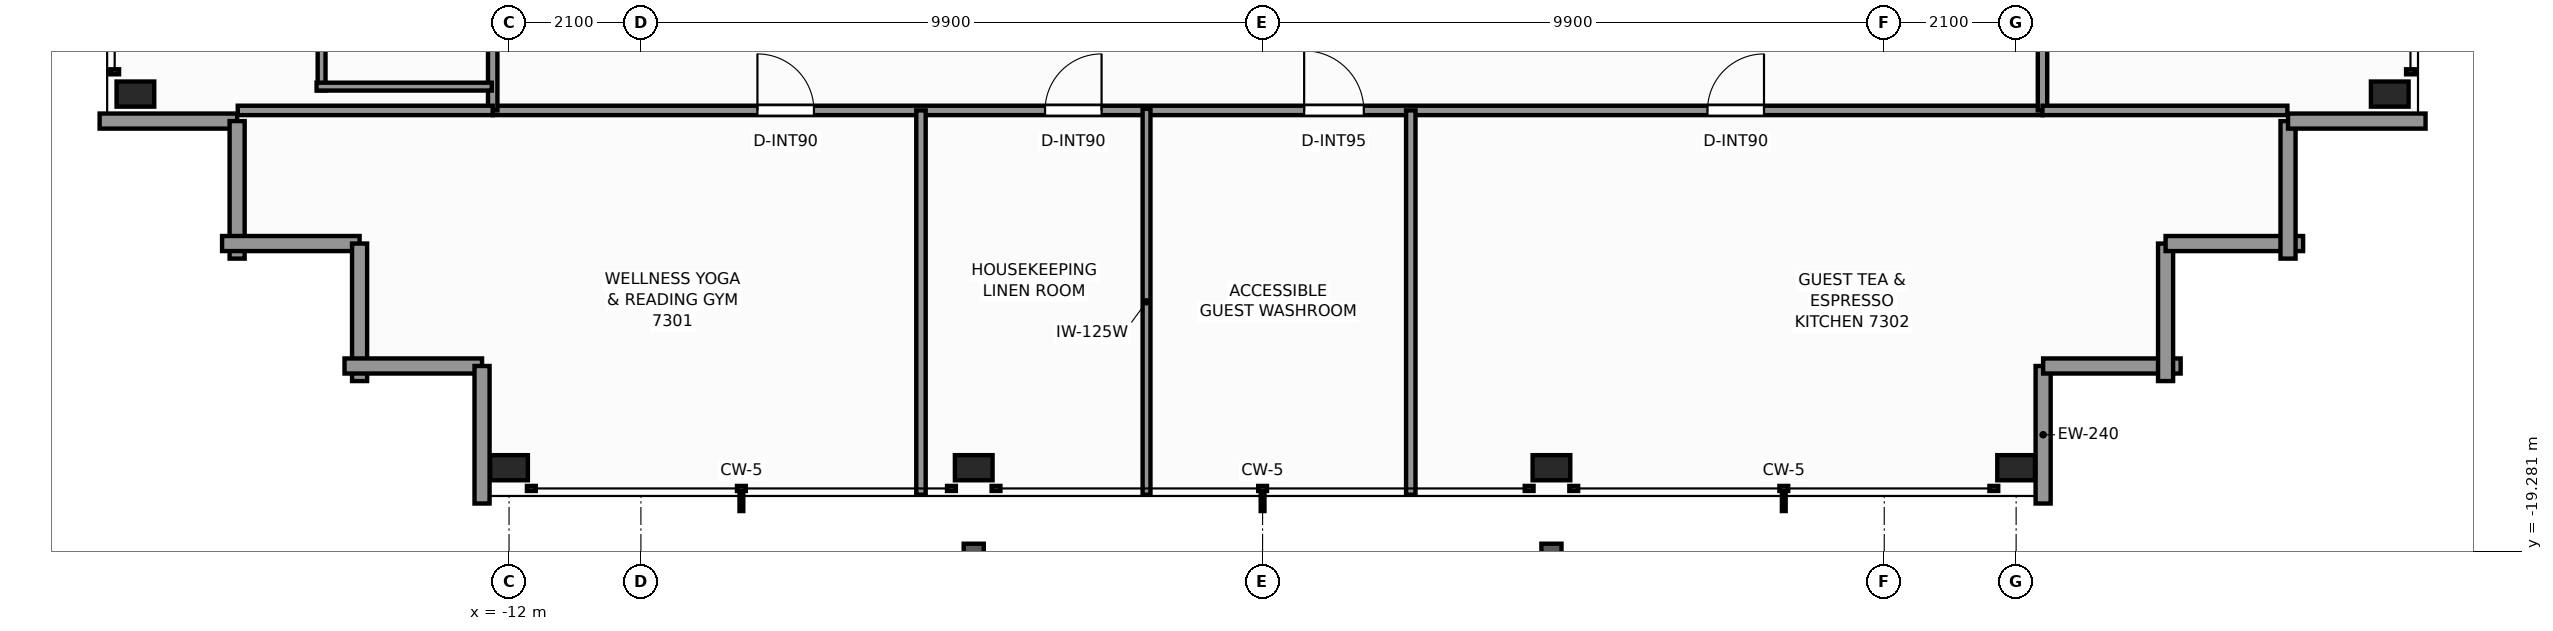
"""IFC4 building model, lengths in metres.
Left out: names, types, materials, properties, quantities, classifications, styles, units other than length and angle.
Written with IfcOpenShell. Run it as: python <this file> out.ifc"""

import sys

from ifc_helpers import new_model, si_unit, direction, frame, frame_2d, origin, origin_2d, place, context, subcontext, project, spatial, rectangle, extrude, element, fill, save


model = new_model("IFC4")
c1 = context("Model", 3, precision=1e-05, world=origin(), true_north=direction((0.0, 1.0)))
c2 = subcontext(c1, "Body", "Model", "MODEL_VIEW")
j1 = project(units=[si_unit("LENGTHUNIT", "METRE"), si_unit("PLANEANGLEUNIT", "RADIAN")], contexts=[c1])
p1 = place(None, origin())
s1 = spatial("IfcSite", under=j1, at=p1, CompositionType="ELEMENT")
p2 = place(p1, origin())
s2 = spatial("IfcBuilding", under=s1, at=p2, CompositionType="ELEMENT")
p3 = place(p2, frame((0.0, 0.0, 251.4)))
s3 = spatial("IfcBuildingStorey", under=s2, at=p3, CompositionType="ELEMENT", Elevation=251.4)
for number, where, z_axis, x_axis in (
    (1, (-12.0, -17.95, 0.0), (0.0, 0.0, 1.0), (1.0, 0.0, 0.0)),
    (2, (-4.6, -17.95, 0.0), (0.0, 0.0, 1.0), (1.0, 0.0, 0.0)),
    (3, (4.6, -17.95, 0.0), (0.0, 0.0, 1.0), (1.0, 0.0, 0.0)),
    (4, (12.0, -17.95, 0.0), (0.0, 0.0, 1.0), (1.0, 0.0, 0.0)),
    (5, (-17.95, -12.0, 0.0), (0.0, 0.0, 1.0), (1.0, 0.0, 0.0)),
    (6, (17.95, -12.0, 0.0), (0.0, 0.0, 1.0), (1.0, 0.0, 0.0)),
):
    element("IfcColumn", number, at=place(p3, frame(where, z_axis=z_axis, x_axis=x_axis)), inside=s3, PredefinedType="COLUMN", context=c2, shape_type="SweptSolid", body=[
        extrude(rectangle(XDim=0.6, YDim=0.4, at=origin_2d()), origin(), (0.0, 0.0, 1.0), 3.5),
    ])
p4 = place(p3, frame((12.43, -16.33, 0.0), z_axis=(0.0, 0.0, 1.0), x_axis=(0.0, -1.0, 0.0)))
e7 = element("IfcWall", 7, at=p4, inside=s3, PredefinedType="STANDARD", context=c2, shape_type="SweptSolid", body=[
    extrude(rectangle(XDim=2.19, YDim=0.24, at=frame_2d((1.095, 0.0))), origin(), (0.0, 0.0, 1.0), 2.633),
])
for number, where, z_axis, x_axis in (
    (8, (14.62, -16.33, 0.0), (0.0, 0.0, 1.0), (-1.0, 0.0, 0.0)),
    (9, (14.38, -14.38, 0.0), (0.0, 0.0, 1.0), (0.0, -1.0, 0.0)),
    (10, (16.57, -14.38, 0.0), (0.0, 0.0, 1.0), (-1.0, 0.0, 0.0)),
    (11, (16.33, -12.43, 0.0), (0.0, 0.0, 1.0), (0.0, -1.0, 0.0)),
):
    element("IfcWall", number, at=place(p3, frame(where, z_axis=z_axis, x_axis=x_axis)), inside=s3, PredefinedType="STANDARD", context=c2, shape_type="SweptSolid", body=[
        extrude(rectangle(XDim=2.19, YDim=0.24, at=frame_2d((1.095, 0.0))), origin(), (0.0, 0.0, 1.0), 2.633),
    ])
for number, where, z_axis, x_axis in (
    (12, (18.52, -12.43, 0.0), (0.0, 0.0, 1.0), (-1.0, 0.0, 0.0)),
    (13, (-16.33, -12.43, 0.0), (0.0, 0.0, 1.0), (-1.0, 0.0, 0.0)),
):
    element("IfcWall", number, at=place(p3, frame(where, z_axis=z_axis, x_axis=x_axis)), inside=s3, PredefinedType="STANDARD", context=c2, shape_type="SweptSolid", body=[
        extrude(rectangle(XDim=2.19, YDim=0.24, at=frame_2d((1.095, 0.0))), origin(), (0.0, 0.0, 1.0), 2.633),
    ])
for number, where, z_axis, x_axis in (
    (14, (-16.33, -14.62, 0.0), (0.0, 0.0, 1.0), (0.0, 1.0, 0.0)),
    (15, (-14.38, -14.38, 0.0), (0.0, 0.0, 1.0), (-1.0, 0.0, 0.0)),
    (16, (-14.38, -16.57, 0.0), (0.0, 0.0, 1.0), (0.0, 1.0, 0.0)),
    (17, (-12.43, -16.33, 0.0), (0.0, 0.0, 1.0), (-1.0, 0.0, 0.0)),
):
    element("IfcWall", number, at=place(p3, frame(where, z_axis=z_axis, x_axis=x_axis)), inside=s3, PredefinedType="STANDARD", context=c2, shape_type="SweptSolid", body=[
        extrude(rectangle(XDim=2.19, YDim=0.24, at=frame_2d((1.095, 0.0))), origin(), (0.0, 0.0, 1.0), 2.633),
    ])
p5 = place(p3, frame((-12.43, -18.52, 0.0), z_axis=(0.0, 0.0, 1.0), x_axis=(0.0, 1.0, 0.0)))
e18 = element("IfcWall", 18, at=p5, inside=s3, PredefinedType="STANDARD", context=c2, shape_type="SweptSolid", body=[
    extrude(rectangle(XDim=2.19, YDim=0.24, at=frame_2d((1.095, 0.0))), origin(), (0.0, 0.0, 1.0), 2.633),
])
p6 = place(p3, frame((-12.26, -12.26, 0.0), z_axis=(0.0, 0.0, 1.0), x_axis=(1.0, 0.0, 0.0)))
e19 = element("IfcWall", 19, at=p6, inside=s3, PredefinedType="PARTITIONING", context=c2, shape_type="SweptSolid", body=[
    extrude(rectangle(XDim=24.68, YDim=0.15, at=frame_2d((12.34, 0.0))), origin(), (0.0, 0.0, 1.0), 2.539),
])
p7 = place(p6, frame((4.216, 0.0, 0.0)))
e20 = element("IfcOpeningElement", 20, at=p7, cuts=e19, PredefinedType="OPENING", context=c2, shape_type="SweptSolid", body=[
    extrude(rectangle(XDim=0.9, YDim=2.06, at=frame_2d((0.45, 1.03))), frame((0.0, 0.085, 0.0), z_axis=(0.0, -1.0, 0.0), x_axis=(1.0, 0.0, 0.0)), (0.0, 0.0, 1.0), 0.17),
])
p8 = place(p6, frame((8.796, 0.0, 0.0)))
e21 = element("IfcOpeningElement", 21, at=p8, cuts=e19, PredefinedType="OPENING", context=c2, shape_type="SweptSolid", body=[
    extrude(rectangle(XDim=0.9, YDim=2.06, at=frame_2d((0.45, 1.03))), frame((0.0, 0.085, 0.0), z_axis=(0.0, -1.0, 0.0), x_axis=(1.0, 0.0, 0.0)), (0.0, 0.0, 1.0), 0.17),
])
p9 = place(p6, frame((12.922, 0.0, 0.0)))
e22 = element("IfcOpeningElement", 22, at=p9, cuts=e19, PredefinedType="OPENING", context=c2, shape_type="SweptSolid", body=[
    extrude(rectangle(XDim=0.95, YDim=2.06, at=frame_2d((0.475, 1.03))), frame((0.0, 0.085, 0.0), z_axis=(0.0, -1.0, 0.0), x_axis=(1.0, 0.0, 0.0)), (0.0, 0.0, 1.0), 0.17),
])
p10 = place(p6, frame((19.345, 0.0, 0.0)))
e23 = element("IfcOpeningElement", 23, at=p10, cuts=e19, PredefinedType="OPENING", context=c2, shape_type="SweptSolid", body=[
    extrude(rectangle(XDim=0.9, YDim=2.06, at=frame_2d((0.45, 1.03))), frame((0.0, 0.085, 0.0), z_axis=(0.0, -1.0, 0.0), x_axis=(1.0, 0.0, 0.0)), (0.0, 0.0, 1.0), 0.17),
])
p11 = place(p3, frame((-12.26, -12.26, 0.0), z_axis=(0.0, 0.0, 1.0), x_axis=(0.0, 1.0, 0.0)))
e24 = element("IfcWall", 24, at=p11, inside=s3, PredefinedType="PARTITIONING", context=c2, shape_type="SweptSolid", body=[
    extrude(rectangle(XDim=24.84, YDim=0.15, at=frame_2d((12.42, 0.0))), origin(), (0.0, 0.0, 1.0), 2.539),
])
p12 = place(p11, frame((3.631, 0.0, 0.0)))
e25 = element("IfcOpeningElement", 25, at=p12, cuts=e24, PredefinedType="OPENING", context=c2, shape_type="SweptSolid", body=[
    extrude(rectangle(XDim=0.95, YDim=2.06, at=frame_2d((0.475, 1.03))), frame((0.0, 0.085, 0.0), z_axis=(0.0, -1.0, 0.0), x_axis=(1.0, 0.0, 0.0)), (0.0, 0.0, 1.0), 0.17),
])
p13 = place(p11, frame((8.701, 0.0, 0.0)))
e26 = element("IfcOpeningElement", 26, at=p13, cuts=e24, PredefinedType="OPENING", context=c2, shape_type="SweptSolid", body=[
    extrude(rectangle(XDim=0.95, YDim=2.06, at=frame_2d((0.475, 1.03))), frame((0.0, 0.085, 0.0), z_axis=(0.0, -1.0, 0.0), x_axis=(1.0, 0.0, 0.0)), (0.0, 0.0, 1.0), 0.17),
])
p14 = place(p11, frame((14.031, 0.0, 0.0)))
e27 = element("IfcOpeningElement", 27, at=p14, cuts=e24, PredefinedType="OPENING", context=c2, shape_type="SweptSolid", body=[
    extrude(rectangle(XDim=0.95, YDim=2.06, at=frame_2d((0.475, 1.03))), frame((0.0, 0.085, 0.0), z_axis=(0.0, -1.0, 0.0), x_axis=(1.0, 0.0, 0.0)), (0.0, 0.0, 1.0), 0.17),
])
p15 = place(p11, frame((19.741, 0.0, 0.0)))
e28 = element("IfcOpeningElement", 28, at=p15, cuts=e24, PredefinedType="OPENING", context=c2, shape_type="SweptSolid", body=[
    extrude(rectangle(XDim=0.95, YDim=2.06, at=frame_2d((0.475, 1.03))), frame((0.0, 0.085, 0.0), z_axis=(0.0, -1.0, 0.0), x_axis=(1.0, 0.0, 0.0)), (0.0, 0.0, 1.0), 0.17),
])
p16 = place(p3, frame((12.42, -12.26, 0.0), z_axis=(0.0, 0.0, 1.0), x_axis=(0.0, 1.0, 0.0)))
e29 = element("IfcWall", 29, at=p16, inside=s3, PredefinedType="PARTITIONING", context=c2, shape_type="SweptSolid", body=[
    extrude(rectangle(XDim=24.84, YDim=0.15, at=frame_2d((12.42, 0.0))), origin(), (0.0, 0.0, 1.0), 2.539),
])
p17 = place(p16, frame((4.275, 0.0, 0.0)))
e30 = element("IfcOpeningElement", 30, at=p17, cuts=e29, PredefinedType="OPENING", context=c2, shape_type="SweptSolid", body=[
    extrude(rectangle(XDim=0.9, YDim=2.06, at=frame_2d((0.45, 1.03))), frame((0.0, 0.085, 0.0), z_axis=(0.0, -1.0, 0.0), x_axis=(1.0, 0.0, 0.0)), (0.0, 0.0, 1.0), 0.17),
])
p18 = place(p16, frame((19.345, 0.0, 0.0)))
e31 = element("IfcOpeningElement", 31, at=p18, cuts=e29, PredefinedType="OPENING", context=c2, shape_type="SweptSolid", body=[
    extrude(rectangle(XDim=0.9, YDim=2.06, at=frame_2d((0.45, 1.03))), frame((0.0, 0.085, 0.0), z_axis=(0.0, -1.0, 0.0), x_axis=(1.0, 0.0, 0.0)), (0.0, 0.0, 1.0), 0.17),
])
p19 = place(p3, frame((-16.32, -12.26, 0.0), z_axis=(0.0, 0.0, 1.0), x_axis=(1.0, 0.0, 0.0)))
e32 = element("IfcWall", 32, at=p19, inside=s3, PredefinedType="PARTITIONING", context=c2, shape_type="SweptSolid", body=[
    extrude(rectangle(XDim=4.06, YDim=0.15, at=frame_2d((2.03, 0.0))), origin(), (0.0, 0.0, 1.0), 3.25),
])
p20 = place(p3, frame((12.42, -12.26, 0.0), z_axis=(0.0, 0.0, 1.0), x_axis=(1.0, 0.0, 0.0)))
e33 = element("IfcWall", 33, at=p20, inside=s3, PredefinedType="PARTITIONING", context=c2, shape_type="SweptSolid", body=[
    extrude(rectangle(XDim=3.9, YDim=0.15, at=frame_2d((1.95, 0.0))), origin(), (0.0, 0.0, 1.0), 3.25),
])
for number, where, z_axis, x_axis in (
    (34, (-5.44, -18.38, 0.0), (0.0, 0.0, 1.0), (0.0, 1.0, 0.0)),
    (35, (2.36, -18.38, 0.0), (0.0, 0.0, 1.0), (0.0, 1.0, 0.0)),
):
    element("IfcWall", number, at=place(p3, frame(where, z_axis=z_axis, x_axis=x_axis)), inside=s3, PredefinedType="PARTITIONING", context=c2, shape_type="SweptSolid", body=[
        extrude(rectangle(XDim=6.12, YDim=0.15, at=frame_2d((3.06, 0.0))), origin(), (0.0, 0.0, 1.0), 2.623),
    ])
p21 = place(p3, frame((-1.848, -18.38, 0.0), z_axis=(0.0, 0.0, 1.0), x_axis=(0.0, 1.0, 0.0)))
e36 = element("IfcWall", 36, at=p21, inside=s3, PredefinedType="PARTITIONING", context=c2, shape_type="SweptSolid", body=[
    extrude(rectangle(XDim=6.145, YDim=0.125, at=frame_2d((3.072, 0.0))), origin(), (0.0, 0.0, 1.0), 2.623),
])
p22 = place(p3, frame((-14.985, -11.941, 0.0), z_axis=(0.0, 0.0, 1.0), x_axis=(0.0, 1.0, 0.0)))
e37 = element("IfcWall", 37, at=p22, inside=s3, PredefinedType="PARTITIONING", context=c2, shape_type="SweptSolid", body=[
    extrude(rectangle(XDim=2.37, YDim=0.125, at=frame_2d((1.185, 0.0))), origin(), (0.0, 0.0, 1.0), 2.539),
])
p23 = place(p3, frame((-15.065, -11.881, 0.0), z_axis=(0.0, 0.0, 1.0), x_axis=(1.0, 0.0, 0.0)))
e38 = element("IfcWall", 38, at=p23, inside=s3, PredefinedType="PARTITIONING", context=c2, shape_type="SweptSolid", body=[
    extrude(rectangle(XDim=2.79, YDim=0.125, at=frame_2d((1.395, 0.0))), origin(), (0.0, 0.0, 1.0), 3.25),
])
p24 = place(p7, origin())
e39 = element("IfcDoor", 39, at=p24, inside=s3, OperationType="SINGLE_SWING_LEFT", PredefinedType="DOOR", context=c2, shape_type="SweptSolid", body=[
    extrude(rectangle(XDim=0.9, YDim=2.06, at=frame_2d((0.45, 1.03))), frame((0.0, 0.025, 0.0), z_axis=(0.0, -1.0, 0.0), x_axis=(1.0, 0.0, 0.0)), (0.0, 0.0, 1.0), 0.05),
])
fill(e20, e39)
p25 = place(p8, origin())
e40 = element("IfcDoor", 40, at=p25, inside=s3, OperationType="SINGLE_SWING_RIGHT", PredefinedType="DOOR", context=c2, shape_type="SweptSolid", body=[
    extrude(rectangle(XDim=0.9, YDim=2.06, at=frame_2d((0.45, 1.03))), frame((0.0, 0.025, 0.0), z_axis=(0.0, -1.0, 0.0), x_axis=(1.0, 0.0, 0.0)), (0.0, 0.0, 1.0), 0.05),
])
fill(e21, e40)
p26 = place(p9, origin())
e41 = element("IfcDoor", 41, at=p26, inside=s3, OperationType="SINGLE_SWING_LEFT", PredefinedType="DOOR", context=c2, shape_type="SweptSolid", body=[
    extrude(rectangle(XDim=0.95, YDim=2.06, at=frame_2d((0.475, 1.03))), frame((0.0, 0.025, 0.0), z_axis=(0.0, -1.0, 0.0), x_axis=(1.0, 0.0, 0.0)), (0.0, 0.0, 1.0), 0.05),
])
fill(e22, e41)
p27 = place(p10, origin())
e42 = element("IfcDoor", 42, at=p27, inside=s3, OperationType="SINGLE_SWING_RIGHT", PredefinedType="DOOR", context=c2, shape_type="SweptSolid", body=[
    extrude(rectangle(XDim=0.9, YDim=2.06, at=frame_2d((0.45, 1.03))), frame((0.0, 0.025, 0.0), z_axis=(0.0, -1.0, 0.0), x_axis=(1.0, 0.0, 0.0)), (0.0, 0.0, 1.0), 0.05),
])
fill(e23, e42)
save(model, sys.argv[1])
